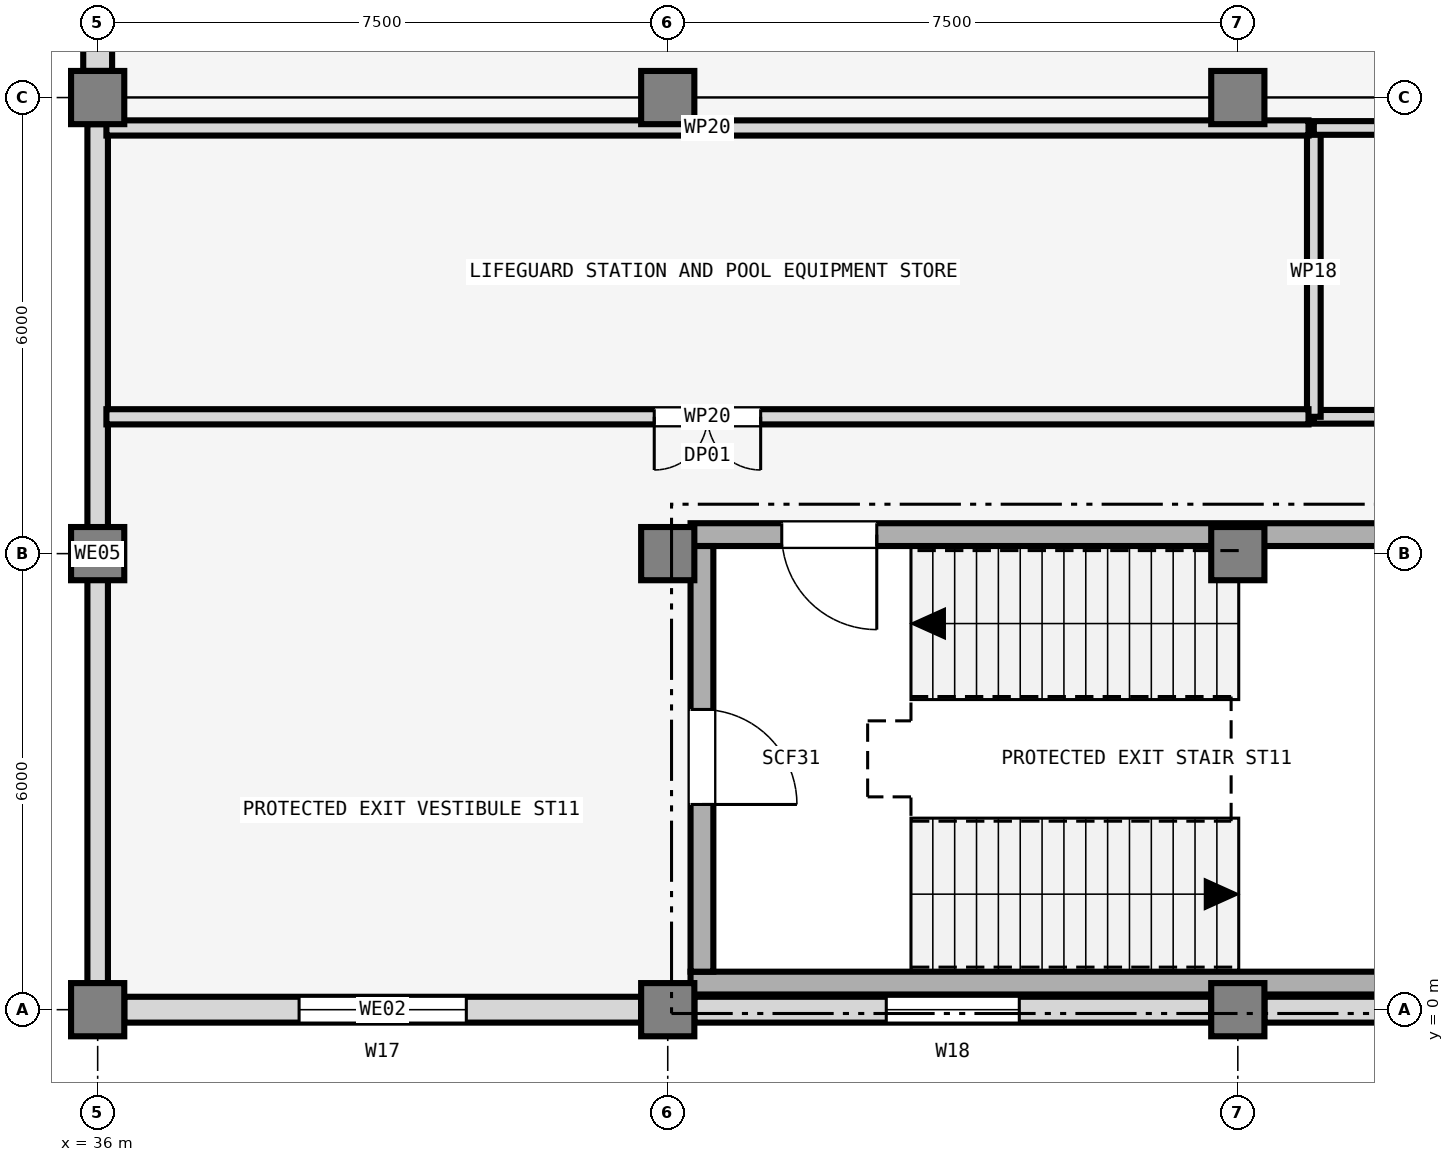
"""IFC4 building model, lengths in metres.
Left out: names, types, materials, properties, quantities, classifications, styles, units other than length and angle.
Written with IfcOpenShell. Run it as: python <this file> out.ifc"""

import sys

from ifc_helpers import new_model, si_unit, direction, frame, frame_2d, origin, origin_2d, place, context, subcontext, project, spatial, rectangle, extrude, element, fill, save


model = new_model("IFC4")
c1 = context("Model", 3, precision=1e-05, world=origin(), true_north=direction((0.0, 1.0)))
c2 = subcontext(c1, "Body", "Model", "MODEL_VIEW")
j1 = project(units=[si_unit("LENGTHUNIT", "METRE"), si_unit("PLANEANGLEUNIT", "RADIAN")], contexts=[c1])
p1 = place(None, origin())
s1 = spatial("IfcSite", under=j1, at=p1, CompositionType="ELEMENT")
p2 = place(p1, origin())
s2 = spatial("IfcBuilding", under=s1, at=p2, CompositionType="ELEMENT")
p3 = place(p2, origin())
s3 = spatial("IfcBuildingStorey", under=s2, at=p3, CompositionType="ELEMENT", Elevation=0.0)
for number, where, z_axis, x_axis in (
    (1, (36.0, 0.0, 0.0), (0.0, 0.0, 1.0), (1.0, 0.0, 0.0)),
    (2, (36.0, 6.0, 0.0), (0.0, 0.0, 1.0), (1.0, 0.0, 0.0)),
    (3, (36.0, 12.0, 0.0), (0.0, 0.0, 1.0), (1.0, 0.0, 0.0)),
    (4, (43.5, 0.0, 0.0), (0.0, 0.0, 1.0), (1.0, 0.0, 0.0)),
    (5, (43.5, 6.0, 0.0), (0.0, 0.0, 1.0), (1.0, 0.0, 0.0)),
    (6, (43.5, 12.0, 0.0), (0.0, 0.0, 1.0), (1.0, 0.0, 0.0)),
    (7, (51.0, 0.0, 0.0), (0.0, 0.0, 1.0), (1.0, 0.0, 0.0)),
    (8, (51.0, 6.0, 0.0), (0.0, 0.0, 1.0), (1.0, 0.0, 0.0)),
    (9, (51.0, 12.0, 0.0), (0.0, 0.0, 1.0), (1.0, 0.0, 0.0)),
):
    element("IfcColumn", number, at=place(p3, frame(where, z_axis=z_axis, x_axis=x_axis)), inside=s3, PredefinedType="COLUMN", context=c2, shape_type="SweptSolid", body=[
        extrude(rectangle(XDim=0.7, YDim=0.7, at=origin_2d()), origin(), (0.0, 0.0, 1.0), 4.8),
    ])
p4 = place(p3, frame((36.0, 21.65, 0.0), z_axis=(0.0, 0.0, 1.0), x_axis=(0.0, -1.0, 0.0)))
e10 = element("IfcWall", 10, at=p4, inside=s3, PredefinedType="SOLIDWALL", context=c2, shape_type="SweptSolid", body=[
    extrude(rectangle(XDim=9.3, YDim=0.38, at=frame_2d((4.65, 0.0))), origin(), (0.0, 0.0, 1.0), 3.62),
])
p5 = place(p4, frame((3.95, 0.0, 0.0)))
e11 = element("IfcOpeningElement", 11, at=p5, cuts=e10, PredefinedType="OPENING", context=c2, shape_type="SweptSolid", body=[
    extrude(rectangle(XDim=4.2, YDim=3.4, at=frame_2d((2.1, 1.7))), frame((0.0, 0.2, 0.0), z_axis=(0.0, -1.0, 0.0), x_axis=(1.0, 0.0, 0.0)), (0.0, 0.0, 1.0), 0.4),
])
p6 = place(p3, frame((36.0, 11.65, 0.0), z_axis=(0.0, 0.0, 1.0), x_axis=(0.0, -1.0, 0.0)))
e12 = element("IfcWall", 12, at=p6, inside=s3, PredefinedType="SOLIDWALL", context=c2, shape_type="SweptSolid", body=[
    extrude(rectangle(XDim=11.3, YDim=0.27, at=frame_2d((5.65, 0.0))), origin(), (0.0, 0.0, 1.0), 3.73),
])
p7 = place(p3, frame((36.35, 0.0, 0.0), z_axis=(0.0, 0.0, 1.0), x_axis=(1.0, 0.0, 0.0)))
e13 = element("IfcWall", 13, at=p7, inside=s3, PredefinedType="SOLIDWALL", context=c2, shape_type="SweptSolid", body=[
    extrude(rectangle(XDim=6.8, YDim=0.34, at=frame_2d((3.4, 0.0))), origin(), (0.0, 0.0, 1.0), 3.93),
])
p8 = place(p7, frame((2.3, 0.0, 2.05)))
e14 = element("IfcOpeningElement", 14, at=p8, cuts=e13, PredefinedType="OPENING", context=c2, shape_type="SweptSolid", body=[
    extrude(rectangle(XDim=2.2, YDim=0.95, at=frame_2d((1.1, 0.475))), frame((0.0, 0.18, 0.0), z_axis=(0.0, -1.0, 0.0), x_axis=(1.0, 0.0, 0.0)), (0.0, 0.0, 1.0), 0.36),
])
p9 = place(p3, frame((43.85, 0.0, 0.0), z_axis=(0.0, 0.0, 1.0), x_axis=(1.0, 0.0, 0.0)))
e15 = element("IfcWall", 15, at=p9, inside=s3, PredefinedType="SOLIDWALL", context=c2, shape_type="SweptSolid", body=[
    extrude(rectangle(XDim=6.8, YDim=0.34, at=frame_2d((3.4, 0.0))), origin(), (0.0, 0.0, 1.0), 3.93),
])
p10 = place(p9, frame((2.525, 0.0, 2.05)))
e16 = element("IfcOpeningElement", 16, at=p10, cuts=e15, PredefinedType="OPENING", context=c2, shape_type="SweptSolid", body=[
    extrude(rectangle(XDim=1.75, YDim=0.9, at=frame_2d((0.875, 0.45))), frame((0.0, 0.18, 0.0), z_axis=(0.0, -1.0, 0.0), x_axis=(1.0, 0.0, 0.0)), (0.0, 0.0, 1.0), 0.36),
])
p11 = place(p3, frame((51.35, 0.0, 0.0), z_axis=(0.0, 0.0, 1.0), x_axis=(1.0, 0.0, 0.0)))
e17 = element("IfcWall", 17, at=p11, inside=s3, PredefinedType="SOLIDWALL", context=c2, shape_type="SweptSolid", body=[
    extrude(rectangle(XDim=6.8, YDim=0.34, at=frame_2d((3.4, 0.0))), origin(), (0.0, 0.0, 1.0), 3.93),
])
p12 = place(p11, frame((2.75, 0.0, 2.05)))
e18 = element("IfcOpeningElement", 18, at=p12, cuts=e17, PredefinedType="OPENING", context=c2, shape_type="SweptSolid", body=[
    extrude(rectangle(XDim=1.3, YDim=0.85, at=frame_2d((0.65, 0.425))), frame((0.0, 0.18, 0.0), z_axis=(0.0, -1.0, 0.0), x_axis=(1.0, 0.0, 0.0)), (0.0, 0.0, 1.0), 0.36),
])
p13 = place(p3, frame((55.8, 0.35, 0.0), z_axis=(0.0, 0.0, 1.0), x_axis=(-1.0, 0.0, 0.0)))
e19 = element("IfcWall", 19, at=p13, inside=s3, PredefinedType="SHEAR", context=c2, shape_type="SweptSolid", body=[
    extrude(rectangle(XDim=12.0, YDim=0.3, at=frame_2d((6.0, 0.0))), origin(), (0.0, 0.0, 1.0), 4.8),
])
p14 = place(p3, frame((55.8, 6.25, 0.0), z_axis=(0.0, 0.0, 1.0), x_axis=(-1.0, 0.0, 0.0)))
e20 = element("IfcWall", 20, at=p14, inside=s3, PredefinedType="SHEAR", context=c2, shape_type="SweptSolid", body=[
    extrude(rectangle(XDim=12.0, YDim=0.3, at=frame_2d((6.0, 0.0))), origin(), (0.0, 0.0, 1.0), 4.8),
])
p15 = place(p14, frame((9.55, 0.0, 0.0)))
e21 = element("IfcOpeningElement", 21, at=p15, cuts=e20, PredefinedType="OPENING", context=c2, shape_type="SweptSolid", body=[
    extrude(rectangle(XDim=1.25, YDim=2.15, at=frame_2d((0.625, 1.075))), frame((0.0, 0.16, 0.0), z_axis=(0.0, -1.0, 0.0), x_axis=(1.0, 0.0, 0.0)), (0.0, 0.0, 1.0), 0.32),
])
p16 = place(p3, frame((43.95, 6.1, 0.0), z_axis=(0.0, 0.0, 1.0), x_axis=(0.0, -1.0, 0.0)))
e22 = element("IfcWall", 22, at=p16, inside=s3, PredefinedType="SHEAR", context=c2, shape_type="SweptSolid", body=[
    extrude(rectangle(XDim=5.6, YDim=0.3, at=frame_2d((2.8, 0.0))), origin(), (0.0, 0.0, 1.0), 4.8),
])
p17 = place(p16, frame((2.15, 0.0, 0.0)))
e23 = element("IfcOpeningElement", 23, at=p17, cuts=e22, PredefinedType="OPENING", context=c2, shape_type="SweptSolid", body=[
    extrude(rectangle(XDim=1.25, YDim=2.15, at=frame_2d((0.625, 1.075))), frame((0.0, 0.16, 0.0), z_axis=(0.0, -1.0, 0.0), x_axis=(1.0, 0.0, 0.0)), (0.0, 0.0, 1.0), 0.32),
])
p18 = place(p3, frame((104.0, 7.8, 0.0), z_axis=(0.0, 0.0, 1.0), x_axis=(-1.0, 0.0, 0.0)))
e24 = element("IfcWall", 24, at=p18, inside=s3, PredefinedType="PARTITIONING", context=c2, shape_type="SweptSolid", body=[
    extrude(rectangle(XDim=52.0, YDim=0.18, at=frame_2d((26.0, 0.0))), origin(), (0.0, 0.0, 1.0), 3.68),
])
p19 = place(p18, frame((25.45, 0.0, 0.0)))
e25 = element("IfcOpeningElement", 25, at=p19, cuts=e24, PredefinedType="OPENING", context=c2, shape_type="SweptSolid", body=[
    extrude(rectangle(XDim=1.1, YDim=2.1, at=frame_2d((0.55, 1.05))), frame((0.0, 0.1, 0.0), z_axis=(0.0, -1.0, 0.0), x_axis=(1.0, 0.0, 0.0)), (0.0, 0.0, 1.0), 0.2),
])
p20 = place(p3, frame((52.0, 7.8, 0.0), z_axis=(0.0, 0.0, 1.0), x_axis=(0.0, 1.0, 0.0)))
e26 = element("IfcWall", 26, at=p20, inside=s3, PredefinedType="PARTITIONING", context=c2, shape_type="SweptSolid", body=[
    extrude(rectangle(XDim=3.8, YDim=0.18, at=frame_2d((1.9, 0.0))), origin(), (0.0, 0.0, 1.0), 3.375),
])
p21 = place(p3, frame((52.0, 11.6, 0.0), z_axis=(0.0, 0.0, 1.0), x_axis=(1.0, 0.0, 0.0)))
e27 = element("IfcWall", 27, at=p21, inside=s3, PredefinedType="PARTITIONING", context=c2, shape_type="SweptSolid", body=[
    extrude(rectangle(XDim=52.0, YDim=0.18, at=frame_2d((26.0, 0.0))), origin(), (0.0, 0.0, 1.0), 3.375),
])
p22 = place(p3, frame((51.93, 7.8, 0.0), z_axis=(0.0, 0.0, 1.0), x_axis=(-1.0, 0.0, 0.0)))
e28 = element("IfcWall", 28, at=p22, inside=s3, PredefinedType="PARTITIONING", context=c2, shape_type="SweptSolid", body=[
    extrude(rectangle(XDim=15.815, YDim=0.2, at=frame_2d((7.907, 0.0))), origin(), (0.0, 0.0, 1.0), 3.68),
])
p23 = place(p22, frame((7.208, 0.0, 0.0)))
e29 = element("IfcOpeningElement", 29, at=p23, cuts=e28, PredefinedType="OPENING", context=c2, shape_type="SweptSolid", body=[
    extrude(rectangle(XDim=1.4, YDim=2.2, at=frame_2d((0.7, 1.1))), frame((0.0, 0.11, 0.0), z_axis=(0.0, -1.0, 0.0), x_axis=(1.0, 0.0, 0.0)), (0.0, 0.0, 1.0), 0.22),
])
p24 = place(p3, frame((36.115, 11.6, 0.0), z_axis=(0.0, 0.0, 1.0), x_axis=(1.0, 0.0, 0.0)))
e30 = element("IfcWall", 30, at=p24, inside=s3, PredefinedType="PARTITIONING", context=c2, shape_type="SweptSolid", body=[
    extrude(rectangle(XDim=15.815, YDim=0.2, at=frame_2d((7.907, 0.0))), origin(), (0.0, 0.0, 1.0), 3.375),
])
p25 = place(p8, origin())
e31 = element("IfcWindow", 31, at=p25, inside=s3, PartitioningType="SINGLE_PANEL", PredefinedType="WINDOW", context=c2, shape_type="SweptSolid", body=[
    extrude(rectangle(XDim=2.2, YDim=0.95, at=frame_2d((1.1, 0.475))), frame((0.0, 0.03, 0.0), z_axis=(0.0, -1.0, 0.0), x_axis=(1.0, 0.0, 0.0)), (0.0, 0.0, 1.0), 0.06),
])
fill(e14, e31)
p26 = place(p10, origin())
e32 = element("IfcWindow", 32, at=p26, inside=s3, PartitioningType="SINGLE_PANEL", PredefinedType="WINDOW", context=c2, shape_type="SweptSolid", body=[
    extrude(rectangle(XDim=1.75, YDim=0.9, at=frame_2d((0.875, 0.45))), frame((0.0, 0.03, 0.0), z_axis=(0.0, -1.0, 0.0), x_axis=(1.0, 0.0, 0.0)), (0.0, 0.0, 1.0), 0.06),
])
fill(e16, e32)
p27 = place(p15, origin())
e33 = element("IfcDoor", 33, at=p27, inside=s3, OperationType="SINGLE_SWING_LEFT", PredefinedType="DOOR", context=c2, shape_type="SweptSolid", body=[
    extrude(rectangle(XDim=1.25, YDim=2.15, at=frame_2d((0.625, 1.075))), frame((0.0, 0.025, 0.0), z_axis=(0.0, -1.0, 0.0), x_axis=(1.0, 0.0, 0.0)), (0.0, 0.0, 1.0), 0.05),
])
fill(e21, e33)
p28 = place(p17, origin())
e34 = element("IfcDoor", 34, at=p28, inside=s3, OperationType="SINGLE_SWING_RIGHT", PredefinedType="DOOR", context=c2, shape_type="SweptSolid", body=[
    extrude(rectangle(XDim=1.25, YDim=2.15, at=frame_2d((0.625, 1.075))), frame((0.0, 0.025, 0.0), z_axis=(0.0, -1.0, 0.0), x_axis=(1.0, 0.0, 0.0)), (0.0, 0.0, 1.0), 0.05),
])
fill(e23, e34)
p29 = place(p23, origin())
e35 = element("IfcDoor", 35, at=p29, inside=s3, OperationType="DOUBLE_DOOR_SINGLE_SWING", PredefinedType="DOOR", context=c2, shape_type="SweptSolid", body=[
    extrude(rectangle(XDim=1.4, YDim=2.2, at=frame_2d((0.7, 1.1))), frame((0.0, 0.025, 0.0), z_axis=(0.0, -1.0, 0.0), x_axis=(1.0, 0.0, 0.0)), (0.0, 0.0, 1.0), 0.05),
])
fill(e29, e35)
save(model, sys.argv[1])
